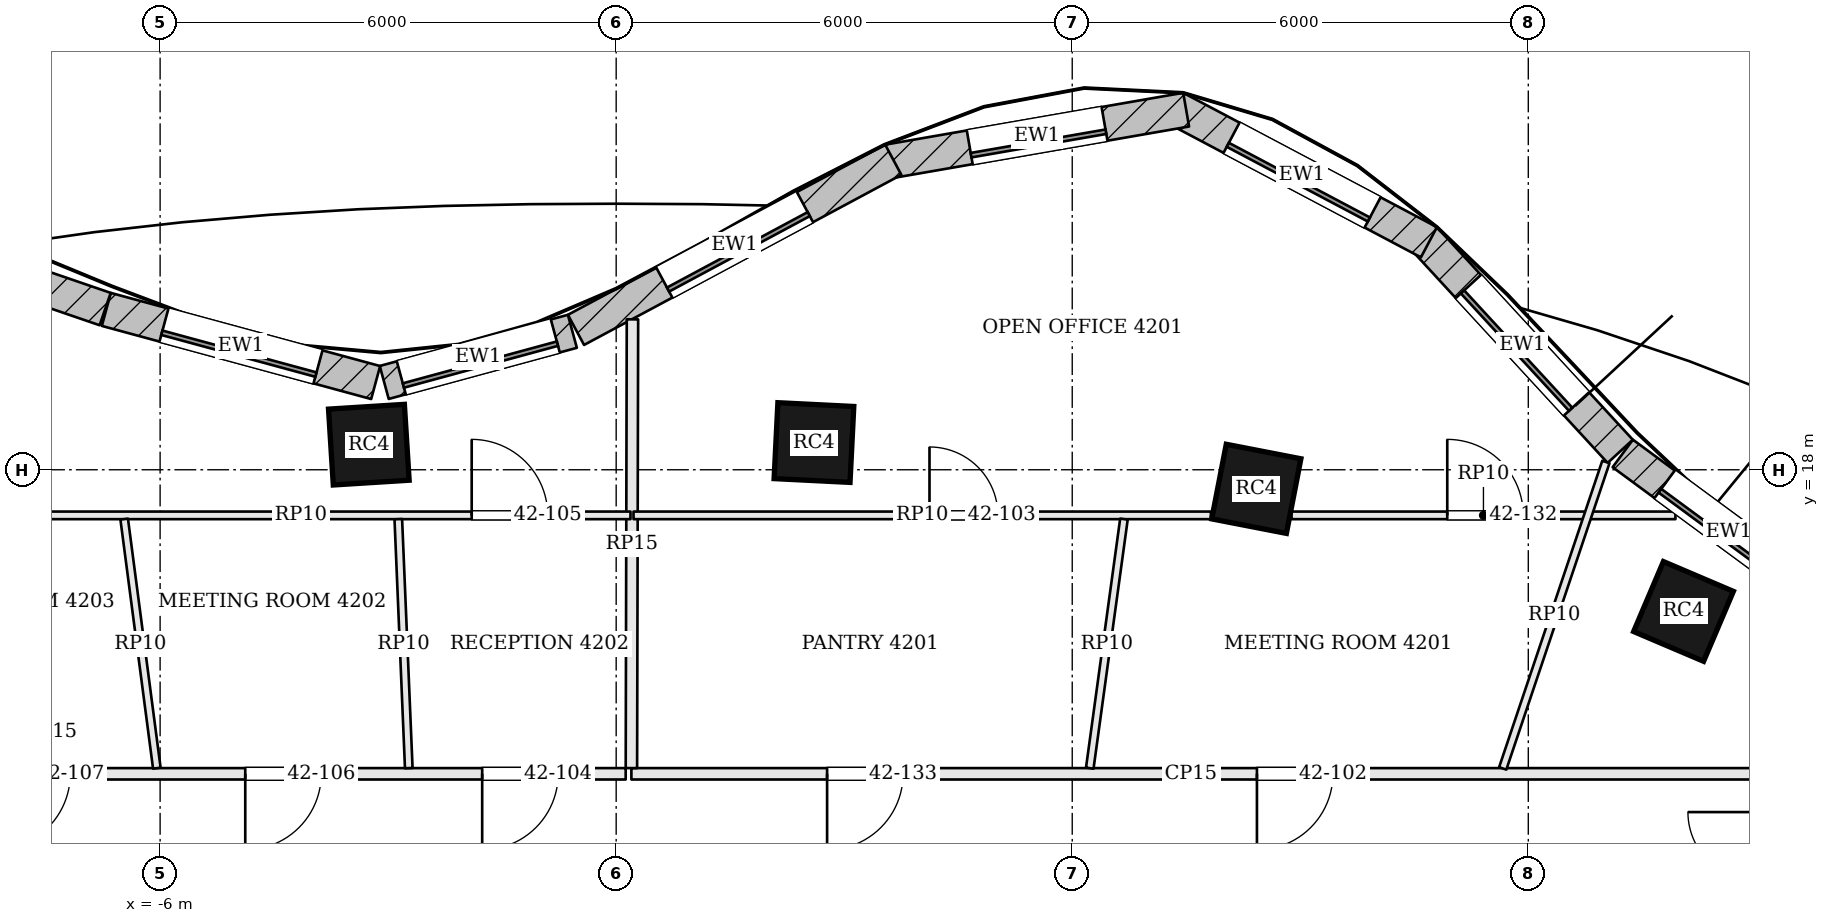
"""IFC4 building model, lengths in metres.
Left out: names, types, materials, properties, quantities, classifications, styles, units other than length and angle.
Written with IfcOpenShell. Run it as: python <this file> out.ifc"""

import sys

from ifc_helpers import new_model, si_unit, direction, frame, frame_2d, origin, origin_2d, place, context, subcontext, project, spatial, rectangle, extrude, element, fill, save


model = new_model("IFC4")
c1 = context("Model", 3, precision=1e-05, world=origin(), true_north=direction((0.0, 1.0)))
c2 = subcontext(c1, "Body", "Model", "MODEL_VIEW")
j1 = project(units=[si_unit("LENGTHUNIT", "METRE"), si_unit("PLANEANGLEUNIT", "RADIAN")], contexts=[c1])
p1 = place(None, origin())
s1 = spatial("IfcSite", under=j1, at=p1, CompositionType="ELEMENT")
p2 = place(p1, origin())
s2 = spatial("IfcBuilding", under=s1, at=p2, CompositionType="ELEMENT")
p3 = place(p2, frame((0.0, 0.0, 174.0)))
s3 = spatial("IfcBuildingStorey", under=s2, at=p3, CompositionType="ELEMENT", Elevation=174.0)
for number, where, z_axis, x_axis in (
    (1, (14.042, 16.136, -0.7), (0.0, 0.0, 1.0), (-0.92, 0.392, 0.0)),
    (2, (8.422, 17.749, -0.7), (0.0, 0.0, 1.0), (-0.982, 0.191, 0.0)),
    (3, (2.602, 18.358, -0.7), (0.0, 0.0, 1.0), (-0.999, 0.05, 0.0)),
    (4, (-3.254, 18.33, -0.7), (0.0, 0.0, 1.0), (-0.998, -0.063, 0.0)),
):
    element("IfcColumn", number, at=place(p3, frame(where, z_axis=z_axis, x_axis=x_axis)), inside=s3, PredefinedType="COLUMN", context=c2, shape_type="SweptSolid", body=[
        extrude(rectangle(XDim=1.0, YDim=1.0, at=origin_2d()), origin(), (0.0, 0.0, 1.0), 4.6),
    ])
p4 = place(p3, frame((16.036, 16.158, 0.0), z_axis=(0.0, 0.0, 1.0), x_axis=(-0.805181432967, 0.593028549064, 0.0)))
e5 = element("IfcWall", 5, at=p4, inside=s3, PredefinedType="SOLIDWALL", context=c2, shape_type="SweptSolid", body=[
    extrude(rectangle(XDim=3.469, YDim=0.45, at=frame_2d((1.734, 0.0))), origin(), (0.0, 0.0, 1.0), 3.7),
])
p5 = place(p4, frame((0.684, 0.0, 0.9)))
e6 = element("IfcOpeningElement", 6, at=p5, cuts=e5, PredefinedType="OPENING", context=c2, shape_type="SweptSolid", body=[
    extrude(rectangle(XDim=2.1, YDim=2.3, at=frame_2d((1.05, 1.15))), frame((0.0, 0.235, 0.0), z_axis=(0.0, -1.0, 0.0), x_axis=(1.0, 0.0, 0.0)), (0.0, 0.0, 1.0), 0.47),
])
p6 = place(p3, frame((13.209, 18.243, 0.0), z_axis=(0.0, 0.0, 1.0), x_axis=(-0.677612152497, 0.735419452278, 0.0)))
e7 = element("IfcWall", 7, at=p6, inside=s3, PredefinedType="SOLIDWALL", context=c2, shape_type="SweptSolid", body=[
    extrude(rectangle(XDim=3.797, YDim=0.45, at=frame_2d((1.898, 0.0))), origin(), (0.0, 0.0, 1.0), 3.7),
])
p7 = place(p6, frame((0.848, 0.0, 0.9)))
e8 = element("IfcOpeningElement", 8, at=p7, cuts=e7, PredefinedType="OPENING", context=c2, shape_type="SweptSolid", body=[
    extrude(rectangle(XDim=2.1, YDim=2.3, at=frame_2d((1.05, 1.15))), frame((0.0, 0.235, 0.0), z_axis=(0.0, -1.0, 0.0), x_axis=(1.0, 0.0, 0.0)), (0.0, 0.0, 1.0), 0.47),
])
p8 = place(p3, frame((10.693, 20.993, 0.0), z_axis=(0.0, 0.0, 1.0), x_axis=(-0.883817790726, 0.46783128668, 0.0)))
e9 = element("IfcWall", 9, at=p8, inside=s3, PredefinedType="SOLIDWALL", context=c2, shape_type="SweptSolid", body=[
    extrude(rectangle(XDim=3.777, YDim=0.45, at=frame_2d((1.888, 0.0))), origin(), (0.0, 0.0, 1.0), 3.7),
])
p9 = place(p8, frame((0.838, 0.0, 0.9)))
e10 = element("IfcOpeningElement", 10, at=p9, cuts=e9, PredefinedType="OPENING", context=c2, shape_type="SweptSolid", body=[
    extrude(rectangle(XDim=2.1, YDim=2.3, at=frame_2d((1.05, 1.15))), frame((0.0, 0.235, 0.0), z_axis=(0.0, -1.0, 0.0), x_axis=(1.0, 0.0, 0.0)), (0.0, 0.0, 1.0), 0.47),
])
p10 = place(p3, frame((7.499, 22.737, 0.0), z_axis=(0.0, 0.0, 1.0), x_axis=(-0.98521220506, -0.171338585849, 0.0)))
e11 = element("IfcWall", 11, at=p10, inside=s3, PredefinedType="SOLIDWALL", context=c2, shape_type="SweptSolid", body=[
    extrude(rectangle(XDim=3.98, YDim=0.45, at=frame_2d((1.99, 0.0))), origin(), (0.0, 0.0, 1.0), 3.7),
])
p11 = place(p10, frame((1.09, 0.0, 0.9)))
e12 = element("IfcOpeningElement", 12, at=p11, cuts=e11, PredefinedType="OPENING", context=c2, shape_type="SweptSolid", body=[
    extrude(rectangle(XDim=1.8, YDim=2.3, at=frame_2d((0.9, 1.15))), frame((0.0, 0.235, 0.0), z_axis=(0.0, -1.0, 0.0), x_axis=(1.0, 0.0, 0.0)), (0.0, 0.0, 1.0), 0.47),
])
p12 = place(p3, frame((3.646, 22.079, 0.0), z_axis=(0.0, 0.0, 1.0), x_axis=(-0.881279133897, -0.472596115259, 0.0)))
e13 = element("IfcWall", 13, at=p12, inside=s3, PredefinedType="SOLIDWALL", context=c2, shape_type="SweptSolid", body=[
    extrude(rectangle(XDim=4.737, YDim=0.45, at=frame_2d((2.368, 0.0))), origin(), (0.0, 0.0, 1.0), 3.7),
])
p13 = place(p12, frame((1.318, 0.0, 0.9)))
e14 = element("IfcOpeningElement", 14, at=p13, cuts=e13, PredefinedType="OPENING", context=c2, shape_type="SweptSolid", body=[
    extrude(rectangle(XDim=2.1, YDim=2.3, at=frame_2d((1.05, 1.15))), frame((0.0, 0.235, 0.0), z_axis=(0.0, -1.0, 0.0), x_axis=(1.0, 0.0, 0.0)), (0.0, 0.0, 1.0), 0.47),
])
p14 = place(p3, frame((-0.576, 19.821, 0.0), z_axis=(0.0, 0.0, 1.0), x_axis=(-0.965009398019, -0.262215296532, 0.0)))
e15 = element("IfcWall", 15, at=p14, inside=s3, PredefinedType="SOLIDWALL", context=c2, shape_type="SweptSolid", body=[
    extrude(rectangle(XDim=2.565, YDim=0.45, at=frame_2d((1.283, 0.0))), origin(), (0.0, 0.0, 1.0), 3.7),
])
p15 = place(p14, frame((0.233, 0.0, 0.9)))
e16 = element("IfcOpeningElement", 16, at=p15, cuts=e15, PredefinedType="OPENING", context=c2, shape_type="SweptSolid", body=[
    extrude(rectangle(XDim=2.1, YDim=2.3, at=frame_2d((1.05, 1.15))), frame((0.0, 0.235, 0.0), z_axis=(0.0, -1.0, 0.0), x_axis=(1.0, 0.0, 0.0)), (0.0, 0.0, 1.0), 0.47),
])
p16 = place(p3, frame((-3.164, 19.147, 0.0), z_axis=(0.0, 0.0, 1.0), x_axis=(-0.965039479998, 0.262104563191, 0.0)))
e17 = element("IfcWall", 17, at=p16, inside=s3, PredefinedType="SOLIDWALL", context=c2, shape_type="SweptSolid", body=[
    extrude(rectangle(XDim=3.672, YDim=0.45, at=frame_2d((1.836, 0.0))), origin(), (0.0, 0.0, 1.0), 3.7),
])
p17 = place(p16, frame((0.786, 0.0, 0.9)))
e18 = element("IfcOpeningElement", 18, at=p17, cuts=e17, PredefinedType="OPENING", context=c2, shape_type="SweptSolid", body=[
    extrude(rectangle(XDim=2.1, YDim=2.3, at=frame_2d((1.05, 1.15))), frame((0.0, 0.235, 0.0), z_axis=(0.0, -1.0, 0.0), x_axis=(1.0, 0.0, 0.0)), (0.0, 0.0, 1.0), 0.47),
])
p18 = place(p3, frame((-6.723, 20.114, 0.0), z_axis=(0.0, 0.0, 1.0), x_axis=(-0.945947299026, 0.324320377815, 0.0)))
e19 = element("IfcWall", 19, at=p18, inside=s3, PredefinedType="SOLIDWALL", context=c2, shape_type="SweptSolid", body=[
    extrude(rectangle(XDim=4.745, YDim=0.45, at=frame_2d((2.372, 0.0))), origin(), (0.0, 0.0, 1.0), 3.7),
])
p19 = place(p18, frame((1.322, 0.0, 0.9)))
e20 = element("IfcOpeningElement", 20, at=p19, cuts=e19, PredefinedType="OPENING", context=c2, shape_type="SweptSolid", body=[
    extrude(rectangle(XDim=2.1, YDim=2.3, at=frame_2d((1.05, 1.15))), frame((0.0, 0.235, 0.0), z_axis=(0.0, -1.0, 0.0), x_axis=(1.0, 0.0, 0.0)), (0.0, 0.0, 1.0), 0.47),
])
p20 = place(p3, frame((14.925, 14.0, 0.0), z_axis=(0.0, 0.0, 1.0), x_axis=(-1.0, 0.0, 0.0)))
e21 = element("IfcWall", 21, at=p20, inside=s3, PredefinedType="PARTITIONING", context=c2, shape_type="SweptSolid", body=[
    extrude(rectangle(XDim=14.725, YDim=0.15, at=frame_2d((7.362, 0.0))), origin(), (0.0, 0.0, 1.0), 3.084),
])
p21 = place(p20, frame((5.495, 0.0, 0.0)))
e22 = element("IfcOpeningElement", 22, at=p21, cuts=e21, PredefinedType="OPENING", context=c2, shape_type="SweptSolid", body=[
    extrude(rectangle(XDim=1.0, YDim=2.4, at=frame_2d((0.5, 1.2))), frame((0.0, 0.085, 0.0), z_axis=(0.0, -1.0, 0.0), x_axis=(1.0, 0.0, 0.0)), (0.0, 0.0, 1.0), 0.17),
])
p22 = place(p20, frame((11.15, 0.0, 0.0)))
e23 = element("IfcOpeningElement", 23, at=p22, cuts=e21, PredefinedType="OPENING", context=c2, shape_type="SweptSolid", body=[
    extrude(rectangle(XDim=1.0, YDim=2.1, at=frame_2d((0.5, 1.05))), frame((0.0, 0.085, 0.0), z_axis=(0.0, -1.0, 0.0), x_axis=(1.0, 0.0, 0.0)), (0.0, 0.0, 1.0), 0.17),
])
p23 = place(p3, frame((0.214, 19.979, 0.0), z_axis=(0.0, 0.0, 1.0), x_axis=(-0.002357118586, -0.999997221992, 0.0)))
e24 = element("IfcWall", 24, at=p23, inside=s3, PredefinedType="PARTITIONING", context=c2, shape_type="SweptSolid", body=[
    extrude(rectangle(XDim=5.904, YDim=0.15, at=frame_2d((2.952, 0.0))), origin(), (0.0, 0.0, 1.0), 3.234),
])
p24 = place(p3, frame((0.125, 14.0, 0.0), z_axis=(0.0, 0.0, 1.0), x_axis=(-1.0, 0.0, 0.0)))
e25 = element("IfcWall", 25, at=p24, inside=s3, PredefinedType="PARTITIONING", context=c2, shape_type="SweptSolid", body=[
    extrude(rectangle(XDim=15.125, YDim=0.15, at=frame_2d((7.562, 0.0))), origin(), (0.0, 0.0, 1.0), 3.084),
])
p25 = place(p24, frame((0.888, 0.0, 0.0)))
e26 = element("IfcOpeningElement", 26, at=p25, cuts=e25, PredefinedType="OPENING", context=c2, shape_type="SweptSolid", body=[
    extrude(rectangle(XDim=1.0, YDim=2.1, at=frame_2d((0.5, 1.05))), frame((0.0, 0.085, 0.0), z_axis=(0.0, -1.0, 0.0), x_axis=(1.0, 0.0, 0.0)), (0.0, 0.0, 1.0), 0.17),
])
p26 = place(p24, frame((4.005, 0.0, 0.0)))
e27 = element("IfcOpeningElement", 27, at=p26, cuts=e25, PredefinedType="OPENING", context=c2, shape_type="SweptSolid", body=[
    extrude(rectangle(XDim=1.0, YDim=2.4, at=frame_2d((0.5, 1.2))), frame((0.0, 0.085, 0.0), z_axis=(0.0, -1.0, 0.0), x_axis=(1.0, 0.0, 0.0)), (0.0, 0.0, 1.0), 0.17),
])
p27 = place(p24, frame((7.307, 0.0, 0.0)))
e28 = element("IfcOpeningElement", 28, at=p27, cuts=e25, PredefinedType="OPENING", context=c2, shape_type="SweptSolid", body=[
    extrude(rectangle(XDim=1.0, YDim=2.4, at=frame_2d((0.5, 1.2))), frame((0.0, 0.085, 0.0), z_axis=(0.0, -1.0, 0.0), x_axis=(1.0, 0.0, 0.0)), (0.0, 0.0, 1.0), 0.17),
])
p28 = place(p3, frame((0.228, 17.4, 0.0), z_axis=(0.0, 0.0, 1.0), x_axis=(1.0, 0.0, 0.0)))
e29 = element("IfcWall", 29, at=p28, inside=s3, PredefinedType="PARTITIONING", context=c2, shape_type="SweptSolid", body=[
    extrude(rectangle(XDim=7.596, YDim=0.1, at=frame_2d((3.798, 0.0))), origin(), (0.0, 0.0, 1.0), 3.084),
])
p29 = place(p28, frame((3.894, 0.0, 0.0)))
e30 = element("IfcOpeningElement", 30, at=p29, cuts=e29, PredefinedType="OPENING", context=c2, shape_type="SweptSolid", body=[
    extrude(rectangle(XDim=0.9, YDim=2.1, at=frame_2d((0.45, 1.05))), frame((0.0, 0.06, 0.0), z_axis=(0.0, -1.0, 0.0), x_axis=(1.0, 0.0, 0.0)), (0.0, 0.0, 1.0), 0.12),
])
p30 = place(p3, frame((8.884, 17.4, 0.0), z_axis=(0.0, 0.0, 1.0), x_axis=(1.0, 0.0, 0.0)))
e31 = element("IfcWall", 31, at=p30, inside=s3, PredefinedType="PARTITIONING", context=c2, shape_type="SweptSolid", body=[
    extrude(rectangle(XDim=5.052, YDim=0.1, at=frame_2d((2.526, 0.0))), origin(), (0.0, 0.0, 1.0), 3.084),
])
p31 = place(p30, frame((2.05, 0.0, 0.0)))
e32 = element("IfcOpeningElement", 32, at=p31, cuts=e31, PredefinedType="OPENING", context=c2, shape_type="SweptSolid", body=[
    extrude(rectangle(XDim=1.0, YDim=2.4, at=frame_2d((0.5, 1.2))), frame((0.0, 0.06, 0.0), z_axis=(0.0, -1.0, 0.0), x_axis=(1.0, 0.0, 0.0)), (0.0, 0.0, 1.0), 0.12),
])
p32 = place(p3, frame((11.664, 14.071, 0.0), z_axis=(0.0, 0.0, 1.0), x_axis=(0.319050122348, 0.947737843198, 0.0)))
e33 = element("IfcWall", 33, at=p32, inside=s3, PredefinedType="PARTITIONING", context=c2, shape_type="SweptSolid", body=[
    extrude(rectangle(XDim=4.254, YDim=0.1, at=frame_2d((2.127, 0.0))), origin(), (0.0, 0.0, 1.0), 3.084),
])
p33 = place(p3, frame((6.231, 14.074, 0.0), z_axis=(0.0, 0.0, 1.0), x_axis=(0.135982862237, 0.990711189589, 0.0)))
e34 = element("IfcWall", 34, at=p33, inside=s3, PredefinedType="PARTITIONING", context=c2, shape_type="SweptSolid", body=[
    extrude(rectangle(XDim=3.307, YDim=0.1, at=frame_2d((1.654, 0.0))), origin(), (0.0, 0.0, 1.0), 3.084),
])
p34 = place(p3, frame((-8.483, 17.4, 0.0), z_axis=(0.0, 0.0, 1.0), x_axis=(1.0, 0.0, 0.0)))
e35 = element("IfcWall", 35, at=p34, inside=s3, PredefinedType="PARTITIONING", context=c2, shape_type="SweptSolid", body=[
    extrude(rectangle(XDim=8.671, YDim=0.1, at=frame_2d((4.335, 0.0))), origin(), (0.0, 0.0, 1.0), 3.084),
])
p35 = place(p34, frame((6.582, 0.0, 0.0)))
e36 = element("IfcOpeningElement", 36, at=p35, cuts=e35, PredefinedType="OPENING", context=c2, shape_type="SweptSolid", body=[
    extrude(rectangle(XDim=1.0, YDim=2.1, at=frame_2d((0.5, 1.05))), frame((0.0, 0.06, 0.0), z_axis=(0.0, -1.0, 0.0), x_axis=(1.0, 0.0, 0.0)), (0.0, 0.0, 1.0), 0.12),
])
p36 = place(p3, frame((-2.729, 14.075, 0.0), z_axis=(0.0, 0.0, 1.0), x_axis=(-0.042005382394, 0.99911738442, 0.0)))
e37 = element("IfcWall", 37, at=p36, inside=s3, PredefinedType="PARTITIONING", context=c2, shape_type="SweptSolid", body=[
    extrude(rectangle(XDim=3.278, YDim=0.1, at=frame_2d((1.639, 0.0))), origin(), (0.0, 0.0, 1.0), 3.084),
])
p37 = place(p3, frame((-6.043, 14.074, 0.0), z_axis=(0.0, 0.0, 1.0), x_axis=(-0.12990779889, 0.991526078219, 0.0)))
e38 = element("IfcWall", 38, at=p37, inside=s3, PredefinedType="PARTITIONING", context=c2, shape_type="SweptSolid", body=[
    extrude(rectangle(XDim=3.304, YDim=0.1, at=frame_2d((1.652, 0.0))), origin(), (0.0, 0.0, 1.0), 3.084),
])
p38 = place(p5, origin())
e39 = element("IfcWindow", 39, at=p38, inside=s3, PartitioningType="SINGLE_PANEL", PredefinedType="WINDOW", context=c2, shape_type="SweptSolid", body=[
    extrude(rectangle(XDim=2.1, YDim=2.3, at=frame_2d((1.05, 1.15))), frame((0.0, 0.135, 0.0), z_axis=(0.0, -1.0, 0.0), x_axis=(1.0, 0.0, 0.0)), (0.0, 0.0, 1.0), 0.06),
])
fill(e6, e39)
p39 = place(p7, origin())
e40 = element("IfcWindow", 40, at=p39, inside=s3, PartitioningType="SINGLE_PANEL", PredefinedType="WINDOW", context=c2, shape_type="SweptSolid", body=[
    extrude(rectangle(XDim=2.1, YDim=2.3, at=frame_2d((1.05, 1.15))), frame((0.0, 0.135, 0.0), z_axis=(0.0, -1.0, 0.0), x_axis=(1.0, 0.0, 0.0)), (0.0, 0.0, 1.0), 0.06),
])
fill(e8, e40)
p40 = place(p9, origin())
e41 = element("IfcWindow", 41, at=p40, inside=s3, PartitioningType="SINGLE_PANEL", PredefinedType="WINDOW", context=c2, shape_type="SweptSolid", body=[
    extrude(rectangle(XDim=2.1, YDim=2.3, at=frame_2d((1.05, 1.15))), frame((0.0, 0.135, 0.0), z_axis=(0.0, -1.0, 0.0), x_axis=(1.0, 0.0, 0.0)), (0.0, 0.0, 1.0), 0.06),
])
fill(e10, e41)
p41 = place(p11, origin())
e42 = element("IfcWindow", 42, at=p41, inside=s3, PartitioningType="SINGLE_PANEL", PredefinedType="WINDOW", context=c2, shape_type="SweptSolid", body=[
    extrude(rectangle(XDim=1.8, YDim=2.3, at=frame_2d((0.9, 1.15))), frame((0.0, 0.135, 0.0), z_axis=(0.0, -1.0, 0.0), x_axis=(1.0, 0.0, 0.0)), (0.0, 0.0, 1.0), 0.06),
])
fill(e12, e42)
p42 = place(p13, origin())
e43 = element("IfcWindow", 43, at=p42, inside=s3, PartitioningType="SINGLE_PANEL", PredefinedType="WINDOW", context=c2, shape_type="SweptSolid", body=[
    extrude(rectangle(XDim=2.1, YDim=2.3, at=frame_2d((1.05, 1.15))), frame((0.0, 0.135, 0.0), z_axis=(0.0, -1.0, 0.0), x_axis=(1.0, 0.0, 0.0)), (0.0, 0.0, 1.0), 0.06),
])
fill(e14, e43)
p43 = place(p15, origin())
e44 = element("IfcWindow", 44, at=p43, inside=s3, PartitioningType="SINGLE_PANEL", PredefinedType="WINDOW", context=c2, shape_type="SweptSolid", body=[
    extrude(rectangle(XDim=2.1, YDim=2.3, at=frame_2d((1.05, 1.15))), frame((0.0, 0.135, 0.0), z_axis=(0.0, -1.0, 0.0), x_axis=(1.0, 0.0, 0.0)), (0.0, 0.0, 1.0), 0.06),
])
fill(e16, e44)
p44 = place(p17, origin())
e45 = element("IfcWindow", 45, at=p44, inside=s3, PartitioningType="SINGLE_PANEL", PredefinedType="WINDOW", context=c2, shape_type="SweptSolid", body=[
    extrude(rectangle(XDim=2.1, YDim=2.3, at=frame_2d((1.05, 1.15))), frame((0.0, 0.135, 0.0), z_axis=(0.0, -1.0, 0.0), x_axis=(1.0, 0.0, 0.0)), (0.0, 0.0, 1.0), 0.06),
])
fill(e18, e45)
p45 = place(p21, origin())
e46 = element("IfcDoor", 46, at=p45, inside=s3, OperationType="SINGLE_SWING_RIGHT", PredefinedType="DOOR", context=c2, shape_type="SweptSolid", body=[
    extrude(rectangle(XDim=1.0, YDim=2.4, at=frame_2d((0.5, 1.2))), frame((0.0, 0.025, 0.0), z_axis=(0.0, -1.0, 0.0), x_axis=(1.0, 0.0, 0.0)), (0.0, 0.0, 1.0), 0.05),
])
fill(e22, e46)
p46 = place(p29, origin())
e47 = element("IfcDoor", 47, at=p46, inside=s3, OperationType="SINGLE_SWING_LEFT", PredefinedType="DOOR", context=c2, shape_type="SweptSolid", body=[
    extrude(rectangle(XDim=0.9, YDim=2.1, at=frame_2d((0.45, 1.05))), frame((0.0, 0.025, 0.0), z_axis=(0.0, -1.0, 0.0), x_axis=(1.0, 0.0, 0.0)), (0.0, 0.0, 1.0), 0.05),
])
fill(e30, e47)
p47 = place(p25, origin())
e48 = element("IfcDoor", 48, at=p47, inside=s3, OperationType="SINGLE_SWING_RIGHT", PredefinedType="DOOR", context=c2, shape_type="SweptSolid", body=[
    extrude(rectangle(XDim=1.0, YDim=2.1, at=frame_2d((0.5, 1.05))), frame((0.0, 0.025, 0.0), z_axis=(0.0, -1.0, 0.0), x_axis=(1.0, 0.0, 0.0)), (0.0, 0.0, 1.0), 0.05),
])
fill(e26, e48)
p48 = place(p35, origin())
e49 = element("IfcDoor", 49, at=p48, inside=s3, OperationType="SINGLE_SWING_LEFT", PredefinedType="DOOR", context=c2, shape_type="SweptSolid", body=[
    extrude(rectangle(XDim=1.0, YDim=2.1, at=frame_2d((0.5, 1.05))), frame((0.0, 0.025, 0.0), z_axis=(0.0, -1.0, 0.0), x_axis=(1.0, 0.0, 0.0)), (0.0, 0.0, 1.0), 0.05),
])
fill(e36, e49)
p49 = place(p26, origin())
e50 = element("IfcDoor", 50, at=p49, inside=s3, OperationType="SINGLE_SWING_RIGHT", PredefinedType="DOOR", context=c2, shape_type="SweptSolid", body=[
    extrude(rectangle(XDim=1.0, YDim=2.4, at=frame_2d((0.5, 1.2))), frame((0.0, 0.025, 0.0), z_axis=(0.0, -1.0, 0.0), x_axis=(1.0, 0.0, 0.0)), (0.0, 0.0, 1.0), 0.05),
])
fill(e27, e50)
p50 = place(p27, origin())
e51 = element("IfcDoor", 51, at=p50, inside=s3, OperationType="SINGLE_SWING_RIGHT", PredefinedType="DOOR", context=c2, shape_type="SweptSolid", body=[
    extrude(rectangle(XDim=1.0, YDim=2.4, at=frame_2d((0.5, 1.2))), frame((0.0, 0.025, 0.0), z_axis=(0.0, -1.0, 0.0), x_axis=(1.0, 0.0, 0.0)), (0.0, 0.0, 1.0), 0.05),
])
fill(e28, e51)
p51 = place(p31, origin())
e52 = element("IfcDoor", 52, at=p51, inside=s3, OperationType="SINGLE_SWING_LEFT", PredefinedType="DOOR", context=c2, shape_type="SweptSolid", body=[
    extrude(rectangle(XDim=1.0, YDim=2.4, at=frame_2d((0.5, 1.2))), frame((0.0, 0.025, 0.0), z_axis=(0.0, -1.0, 0.0), x_axis=(1.0, 0.0, 0.0)), (0.0, 0.0, 1.0), 0.05),
])
fill(e32, e52)
p52 = place(p22, origin())
e53 = element("IfcDoor", 53, at=p52, inside=s3, OperationType="SINGLE_SWING_RIGHT", PredefinedType="DOOR", context=c2, shape_type="SweptSolid", body=[
    extrude(rectangle(XDim=1.0, YDim=2.1, at=frame_2d((0.5, 1.05))), frame((0.0, 0.025, 0.0), z_axis=(0.0, -1.0, 0.0), x_axis=(1.0, 0.0, 0.0)), (0.0, 0.0, 1.0), 0.05),
])
fill(e23, e53)
save(model, sys.argv[1])
